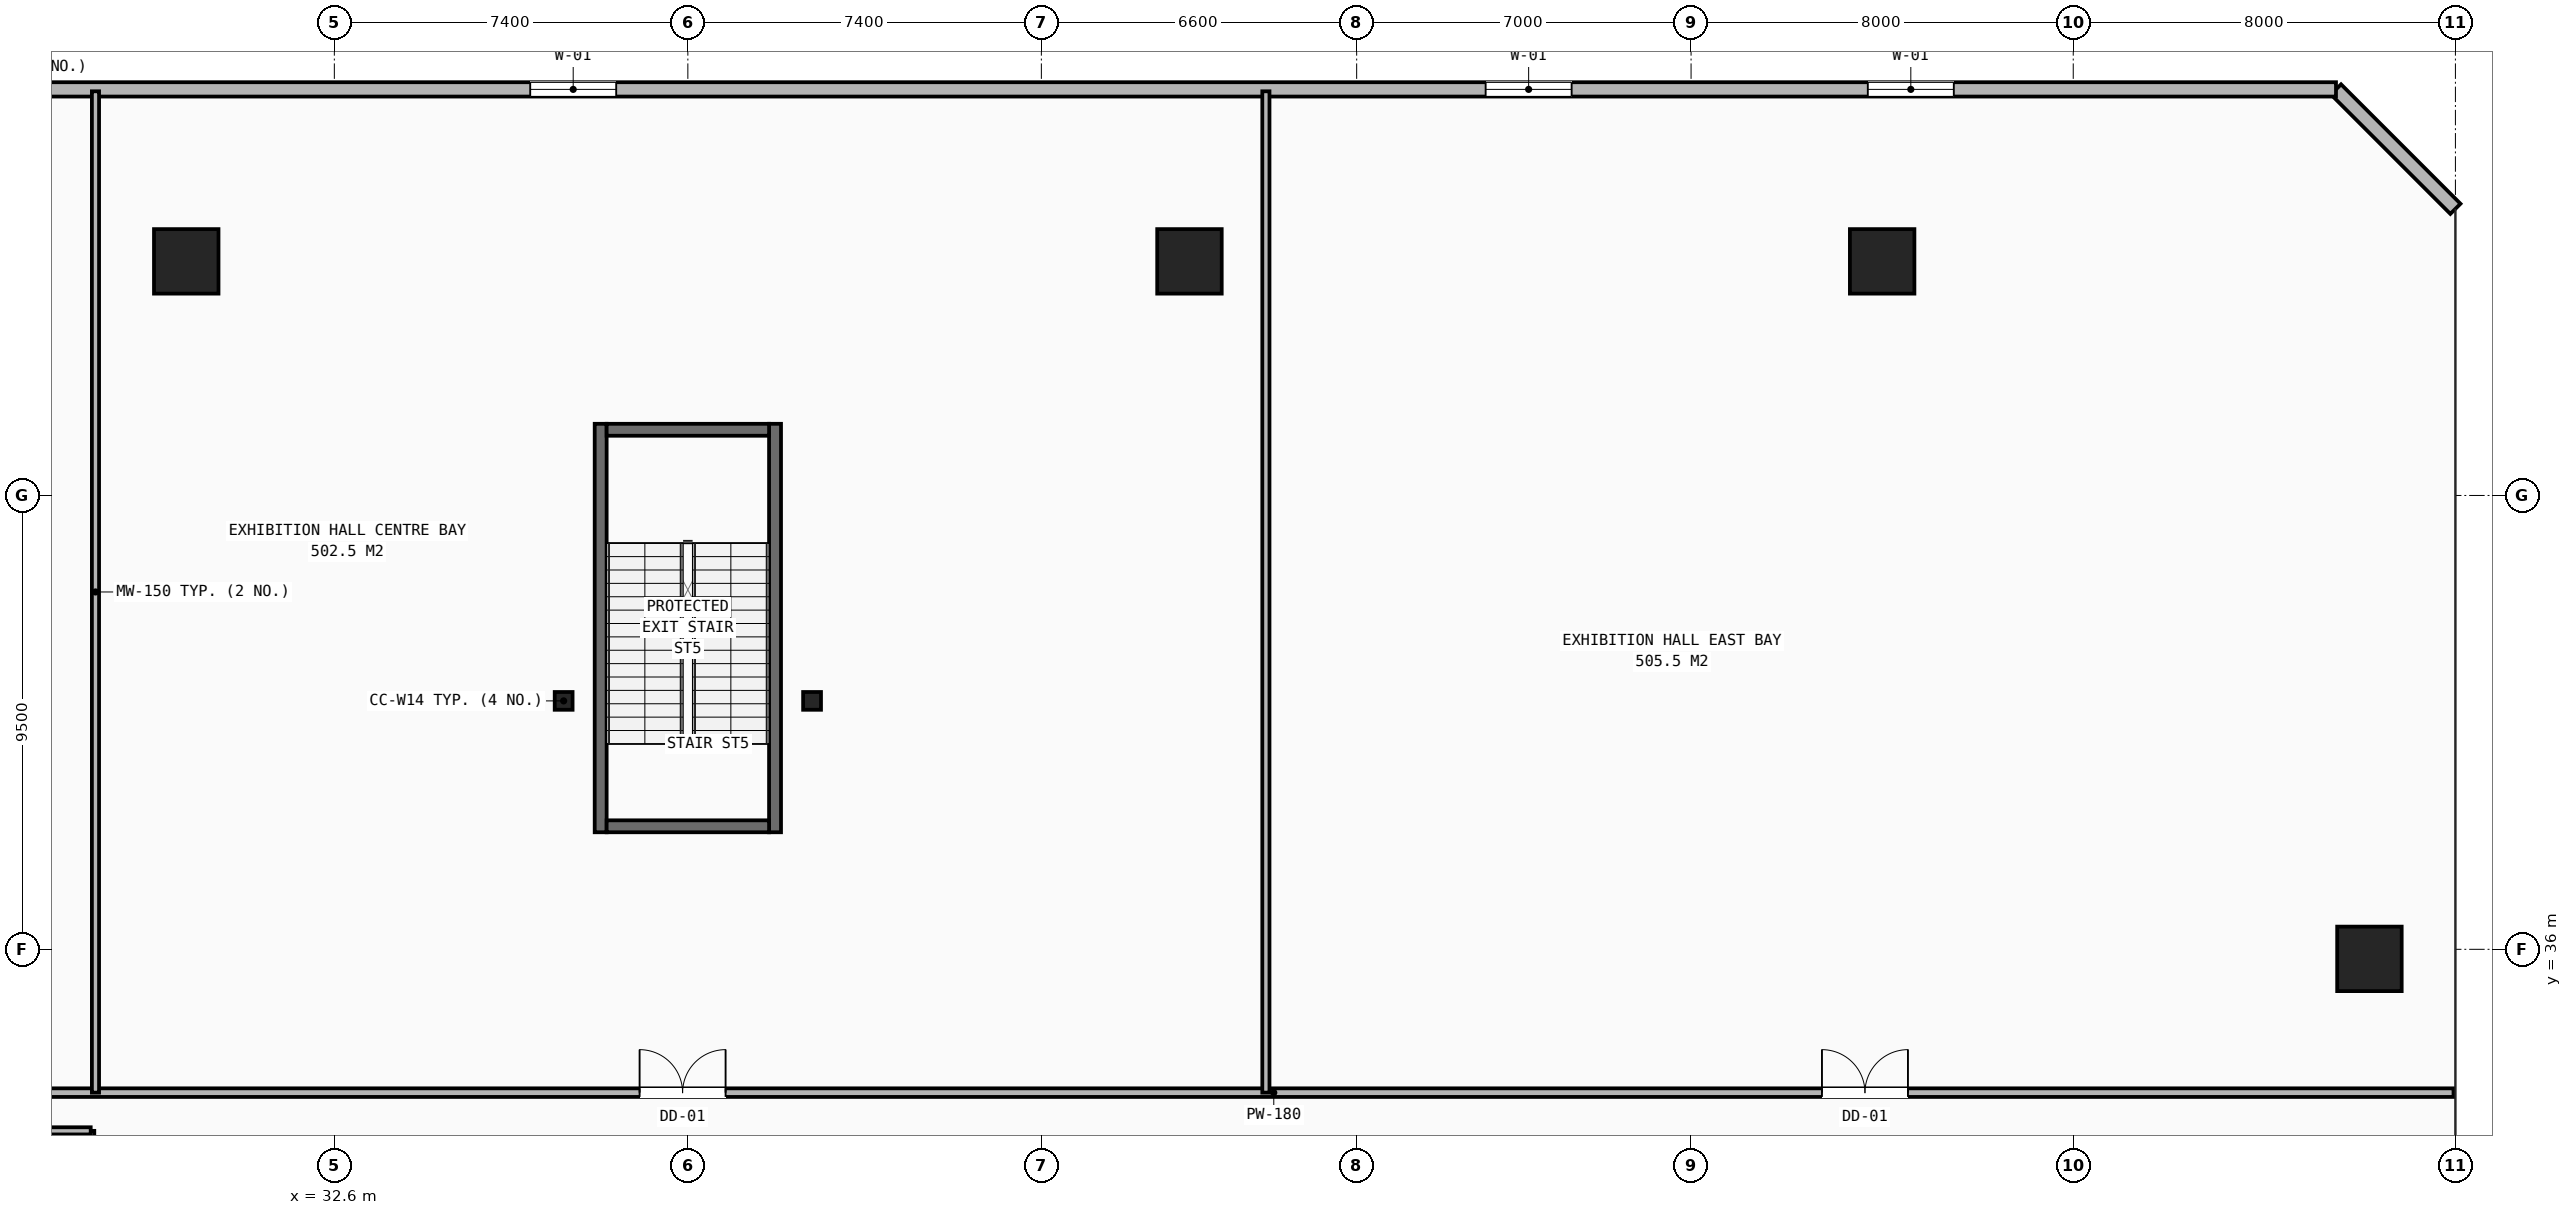
"""IFC4 building model, lengths in metres.
Left out: names, types, materials, properties, quantities, classifications, styles, units other than length and angle.
Written with IfcOpenShell. Run it as: python <this file> out.ifc"""

import sys

from ifc_helpers import new_model, si_unit, direction, frame, frame_2d, origin, origin_2d, place, context, subcontext, project, spatial, rectangle, hollow_rectangle, i_section, extrude, element, fill, save


model = new_model("IFC4")
c1 = context("Model", 3, precision=1e-05, world=origin(), true_north=direction((0.0, 1.0)))
c2 = subcontext(c1, "Body", "Model", "MODEL_VIEW")
j1 = project(units=[si_unit("LENGTHUNIT", "METRE"), si_unit("PLANEANGLEUNIT", "RADIAN")], contexts=[c1])
p1 = place(None, origin())
s1 = spatial("IfcSite", under=j1, at=p1, CompositionType="ELEMENT")
p2 = place(p1, origin())
s2 = spatial("IfcBuilding", under=s1, at=p2, CompositionType="ELEMENT")
p3 = place(p2, frame((0.0, 0.0, 11.0)))
s3 = spatial("IfcBuildingStorey", under=s2, at=p3, CompositionType="ELEMENT", Elevation=11.0)
for number, where, z_axis, x_axis in (
    (1, (37.4, 41.2, 0.0), (0.0, 0.0, 1.0), (1.0, 0.0, 0.0)),
    (2, (42.6, 41.2, 0.0), (0.0, 0.0, 1.0), (1.0, 0.0, 0.0)),
):
    element("IfcColumn", number, at=place(p3, frame(where, z_axis=z_axis, x_axis=x_axis)), inside=s3, PredefinedType="COLUMN", context=c2, shape_type="SweptSolid", body=[
        extrude(i_section(OverallWidth=0.374, OverallDepth=0.372, WebThickness=0.016, FlangeThickness=0.026, at=origin_2d()), origin(), (0.0, 0.0, 1.0), 5.5),
    ])
for number, where, z_axis, x_axis in (
    (3, (75.2, 35.8, 0.0), (0.0, 0.0, 1.0), (1.0, 0.0, 0.0)),
    (4, (29.5, 50.4, 0.0), (0.0, 0.0, 1.0), (1.0, 0.0, 0.0)),
    (5, (50.5, 50.4, 0.0), (0.0, 0.0, 1.0), (1.0, 0.0, 0.0)),
    (6, (65.0, 50.4, 0.0), (0.0, 0.0, 1.0), (1.0, 0.0, 0.0)),
):
    element("IfcColumn", number, at=place(p3, frame(where, z_axis=z_axis, x_axis=x_axis)), inside=s3, PredefinedType="COLUMN", context=c2, shape_type="SweptSolid", body=[
        extrude(hollow_rectangle(XDim=1.35, YDim=1.35, WallThickness=0.085, at=origin_2d()), origin(), (0.0, 0.0, 1.0), 5.5),
    ])
p4 = place(p3, frame((77.0, 51.5, 0.0), z_axis=(0.0, 0.0, 1.0), x_axis=(-0.707106781187, 0.707106781187, 0.0)))
e7 = element("IfcWall", 7, at=p4, inside=s3, PredefinedType="STANDARD", context=c2, shape_type="SweptSolid", body=[
    extrude(rectangle(XDim=3.536, YDim=0.3, at=frame_2d((1.768, 0.0))), origin(), (0.0, 0.0, 1.0), 5.18),
])
p5 = place(p3, frame((74.5, 54.0, 0.0), z_axis=(0.0, 0.0, 1.0), x_axis=(-1.0, 0.0, 0.0)))
e8 = element("IfcWall", 8, at=p5, inside=s3, PredefinedType="STANDARD", context=c2, shape_type="SweptSolid", body=[
    extrude(rectangle(XDim=69.0, YDim=0.3, at=frame_2d((34.5, 0.0))), origin(), (0.0, 0.0, 1.0), 5.18),
])
p6 = place(p5, frame((8.0, 0.0, 1.1)))
e9 = element("IfcOpeningElement", 9, at=p6, cuts=e8, PredefinedType="OPENING", context=c2, shape_type="SweptSolid", body=[
    extrude(rectangle(XDim=1.8, YDim=2.1, at=frame_2d((0.9, 1.05))), frame((0.0, 0.16, 0.0), z_axis=(0.0, -1.0, 0.0), x_axis=(1.0, 0.0, 0.0)), (0.0, 0.0, 1.0), 0.32),
])
p7 = place(p5, frame((16.0, 0.0, 1.1)))
e10 = element("IfcOpeningElement", 10, at=p7, cuts=e8, PredefinedType="OPENING", context=c2, shape_type="SweptSolid", body=[
    extrude(rectangle(XDim=1.8, YDim=2.1, at=frame_2d((0.9, 1.05))), frame((0.0, 0.16, 0.0), z_axis=(0.0, -1.0, 0.0), x_axis=(1.0, 0.0, 0.0)), (0.0, 0.0, 1.0), 0.32),
])
p8 = place(p5, frame((36.0, 0.0, 1.1)))
e11 = element("IfcOpeningElement", 11, at=p8, cuts=e8, PredefinedType="OPENING", context=c2, shape_type="SweptSolid", body=[
    extrude(rectangle(XDim=1.8, YDim=2.1, at=frame_2d((0.9, 1.05))), frame((0.0, 0.16, 0.0), z_axis=(0.0, -1.0, 0.0), x_axis=(1.0, 0.0, 0.0)), (0.0, 0.0, 1.0), 0.32),
])
p9 = place(p5, frame((60.0, 0.0, 1.1)))
e12 = element("IfcOpeningElement", 12, at=p9, cuts=e8, PredefinedType="OPENING", context=c2, shape_type="SweptSolid", body=[
    extrude(rectangle(XDim=1.8, YDim=2.1, at=frame_2d((0.9, 1.05))), frame((0.0, 0.16, 0.0), z_axis=(0.0, -1.0, 0.0), x_axis=(1.0, 0.0, 0.0)), (0.0, 0.0, 1.0), 0.32),
])
p10 = place(p3, frame((3.04, 33.0, 0.0), z_axis=(0.0, 0.0, 1.0), x_axis=(1.0, 0.0, 0.0)))
e13 = element("IfcWall", 13, at=p10, inside=s3, PredefinedType="PARTITIONING", context=c2, shape_type="SweptSolid", body=[
    extrude(rectangle(XDim=73.92, YDim=0.18, at=frame_2d((36.96, 0.0))), origin(), (0.0, 0.0, 1.0), 4.243),
])
p11 = place(p10, frame((11.35, 0.0, 0.0)))
e14 = element("IfcOpeningElement", 14, at=p11, cuts=e13, PredefinedType="OPENING", context=c2, shape_type="SweptSolid", body=[
    extrude(rectangle(XDim=1.8, YDim=2.4, at=frame_2d((0.9, 1.2))), frame((0.0, 0.1, 0.0), z_axis=(0.0, -1.0, 0.0), x_axis=(1.0, 0.0, 0.0)), (0.0, 0.0, 1.0), 0.2),
])
p12 = place(p10, frame((35.95, 0.0, 0.0)))
e15 = element("IfcOpeningElement", 15, at=p12, cuts=e13, PredefinedType="OPENING", context=c2, shape_type="SweptSolid", body=[
    extrude(rectangle(XDim=1.8, YDim=2.4, at=frame_2d((0.9, 1.2))), frame((0.0, 0.1, 0.0), z_axis=(0.0, -1.0, 0.0), x_axis=(1.0, 0.0, 0.0)), (0.0, 0.0, 1.0), 0.2),
])
p13 = place(p10, frame((60.7, 0.0, 0.0)))
e16 = element("IfcOpeningElement", 16, at=p13, cuts=e13, PredefinedType="OPENING", context=c2, shape_type="SweptSolid", body=[
    extrude(rectangle(XDim=1.8, YDim=2.4, at=frame_2d((0.9, 1.2))), frame((0.0, 0.1, 0.0), z_axis=(0.0, -1.0, 0.0), x_axis=(1.0, 0.0, 0.0)), (0.0, 0.0, 1.0), 0.2),
])
for number, where, z_axis, x_axis in (
    (17, (27.6, 33.0, 0.0), (0.0, 0.0, 1.0), (0.0, 1.0, 0.0)),
    (18, (52.1, 33.0, 0.0), (0.0, 0.0, 1.0), (0.0, 1.0, 0.0)),
):
    element("IfcWall", number, at=place(p3, frame(where, z_axis=z_axis, x_axis=x_axis)), inside=s3, PredefinedType="MOVABLE", context=c2, shape_type="SweptSolid", body=[
        extrude(rectangle(XDim=20.96, YDim=0.15, at=frame_2d((10.48, 0.0))), origin(), (0.0, 0.0, 1.0), 4.243),
    ])
p14 = place(p3, frame((27.5, 20.0, 0.0), z_axis=(0.0, 0.0, 1.0), x_axis=(0.0, 1.0, 0.0)))
e19 = element("IfcWall", 19, at=p14, inside=s3, PredefinedType="PARTITIONING", context=c2, shape_type="SweptSolid", body=[
    extrude(rectangle(XDim=12.2, YDim=0.15, at=frame_2d((6.1, 0.0))), origin(), (0.0, 0.0, 1.0), 4.243),
])
p15 = place(p14, frame((1.5, 0.0, 0.0)))
e20 = element("IfcOpeningElement", 20, at=p15, cuts=e19, PredefinedType="OPENING", context=c2, shape_type="SweptSolid", body=[
    extrude(rectangle(XDim=0.95, YDim=2.1, at=frame_2d((0.475, 1.05))), frame((0.0, 0.085, 0.0), z_axis=(0.0, -1.0, 0.0), x_axis=(1.0, 0.0, 0.0)), (0.0, 0.0, 1.0), 0.17),
])
p16 = place(p14, frame((6.0, 0.0, 0.0)))
e21 = element("IfcOpeningElement", 21, at=p16, cuts=e19, PredefinedType="OPENING", context=c2, shape_type="SweptSolid", body=[
    extrude(rectangle(XDim=0.95, YDim=2.1, at=frame_2d((0.475, 1.05))), frame((0.0, 0.085, 0.0), z_axis=(0.0, -1.0, 0.0), x_axis=(1.0, 0.0, 0.0)), (0.0, 0.0, 1.0), 0.17),
])
p17 = place(p14, frame((10.0, 0.0, 0.0)))
e22 = element("IfcOpeningElement", 22, at=p17, cuts=e19, PredefinedType="OPENING", context=c2, shape_type="SweptSolid", body=[
    extrude(rectangle(XDim=0.95, YDim=2.1, at=frame_2d((0.475, 1.05))), frame((0.0, 0.085, 0.0), z_axis=(0.0, -1.0, 0.0), x_axis=(1.0, 0.0, 0.0)), (0.0, 0.0, 1.0), 0.17),
])
p18 = place(p3, frame((22.0, 32.2, 0.0), z_axis=(0.0, 0.0, 1.0), x_axis=(1.0, 0.0, 0.0)))
e23 = element("IfcWall", 23, at=p18, inside=s3, PredefinedType="PARTITIONING", context=c2, shape_type="SweptSolid", body=[
    extrude(rectangle(XDim=5.5, YDim=0.15, at=frame_2d((2.75, 0.0))), origin(), (0.0, 0.0, 1.0), 4.243),
])
for number, where, z_axis, x_axis in (
    (24, (38.175, 38.45, 0.0), (0.0, 0.0, 1.0), (0.0, 1.0, 0.0)),
    (25, (41.825, 38.45, 0.0), (0.0, 0.0, 1.0), (0.0, 1.0, 0.0)),
):
    element("IfcWall", number, at=place(p3, frame(where, z_axis=z_axis, x_axis=x_axis)), inside=s3, PredefinedType="SHEAR", context=c2, shape_type="SweptSolid", body=[
        extrude(rectangle(XDim=8.55, YDim=0.25, at=frame_2d((4.275, 0.0))), origin(), (0.0, 0.0, 1.0), 5.18),
    ])
for number, where, z_axis, x_axis in (
    (26, (38.3, 38.575, 0.0), (0.0, 0.0, 1.0), (1.0, 0.0, 0.0)),
    (27, (38.3, 46.875, 0.0), (0.0, 0.0, 1.0), (1.0, 0.0, 0.0)),
):
    element("IfcWall", number, at=place(p3, frame(where, z_axis=z_axis, x_axis=x_axis)), inside=s3, PredefinedType="SHEAR", context=c2, shape_type="SweptSolid", body=[
        extrude(rectangle(XDim=3.4, YDim=0.25, at=frame_2d((1.7, 0.0))), origin(), (0.0, 0.0, 1.0), 5.18),
    ])
p19 = place(p6, origin())
e28 = element("IfcWindow", 28, at=p19, inside=s3, PartitioningType="SINGLE_PANEL", PredefinedType="WINDOW", context=c2, shape_type="SweptSolid", body=[
    extrude(rectangle(XDim=1.8, YDim=2.1, at=frame_2d((0.9, 1.05))), frame((0.0, 0.03, 0.0), z_axis=(0.0, -1.0, 0.0), x_axis=(1.0, 0.0, 0.0)), (0.0, 0.0, 1.0), 0.06),
])
fill(e9, e28)
p20 = place(p7, origin())
e29 = element("IfcWindow", 29, at=p20, inside=s3, PartitioningType="SINGLE_PANEL", PredefinedType="WINDOW", context=c2, shape_type="SweptSolid", body=[
    extrude(rectangle(XDim=1.8, YDim=2.1, at=frame_2d((0.9, 1.05))), frame((0.0, 0.03, 0.0), z_axis=(0.0, -1.0, 0.0), x_axis=(1.0, 0.0, 0.0)), (0.0, 0.0, 1.0), 0.06),
])
fill(e10, e29)
p21 = place(p8, origin())
e30 = element("IfcWindow", 30, at=p21, inside=s3, PartitioningType="SINGLE_PANEL", PredefinedType="WINDOW", context=c2, shape_type="SweptSolid", body=[
    extrude(rectangle(XDim=1.8, YDim=2.1, at=frame_2d((0.9, 1.05))), frame((0.0, 0.03, 0.0), z_axis=(0.0, -1.0, 0.0), x_axis=(1.0, 0.0, 0.0)), (0.0, 0.0, 1.0), 0.06),
])
fill(e11, e30)
p22 = place(p12, origin())
e31 = element("IfcDoor", 31, at=p22, inside=s3, OperationType="DOUBLE_DOOR_SINGLE_SWING", PredefinedType="DOOR", context=c2, shape_type="SweptSolid", body=[
    extrude(rectangle(XDim=1.8, YDim=2.4, at=frame_2d((0.9, 1.2))), frame((0.0, 0.025, 0.0), z_axis=(0.0, -1.0, 0.0), x_axis=(1.0, 0.0, 0.0)), (0.0, 0.0, 1.0), 0.05),
])
fill(e15, e31)
p23 = place(p13, origin())
e32 = element("IfcDoor", 32, at=p23, inside=s3, OperationType="DOUBLE_DOOR_SINGLE_SWING", PredefinedType="DOOR", context=c2, shape_type="SweptSolid", body=[
    extrude(rectangle(XDim=1.8, YDim=2.4, at=frame_2d((0.9, 1.2))), frame((0.0, 0.025, 0.0), z_axis=(0.0, -1.0, 0.0), x_axis=(1.0, 0.0, 0.0)), (0.0, 0.0, 1.0), 0.05),
])
fill(e16, e32)
save(model, sys.argv[1])
